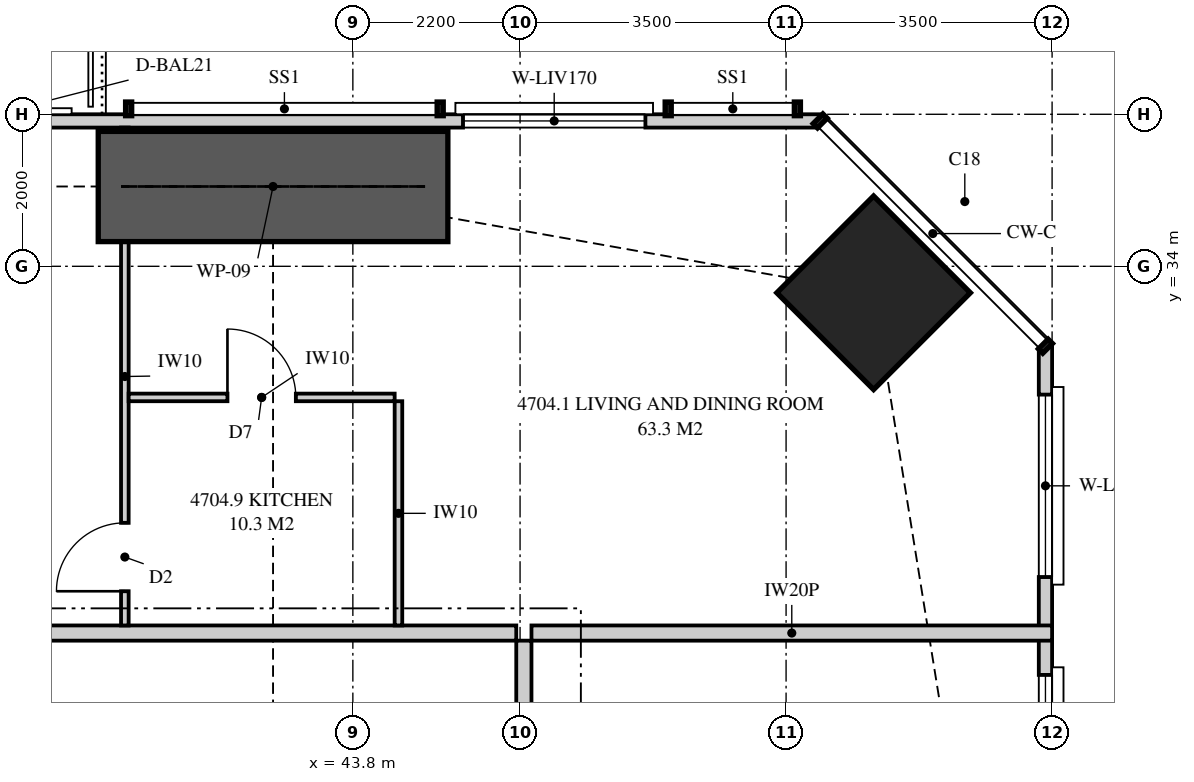
"""IFC4 building model, lengths in metres.
Left out: names, types, materials, properties, quantities, classifications, styles, units other than length and angle.
Written with IfcOpenShell. Run it as: python <this file> out.ifc"""

import sys

from ifc_helpers import new_model, si_unit, direction, frame, frame_2d, origin, origin_2d, place, context, subcontext, project, spatial, polyline, rectangle, outline, extrude, element, fill, save


model = new_model("IFC4")
c1 = context("Model", 3, precision=1e-05, world=origin(), true_north=direction((0.0, 1.0)))
c2 = subcontext(c1, "Body", "Model", "MODEL_VIEW")
j1 = project(units=[si_unit("LENGTHUNIT", "METRE"), si_unit("PLANEANGLEUNIT", "RADIAN")], contexts=[c1])
p1 = place(None, origin())
s1 = spatial("IfcSite", under=j1, at=p1, CompositionType="ELEMENT")
p2 = place(p1, origin())
s2 = spatial("IfcBuilding", under=s1, at=p2, CompositionType="ELEMENT")
p3 = place(p2, frame((0.0, 0.0, 174.45)))
s3 = spatial("IfcBuildingStorey", under=s2, at=p3, CompositionType="ELEMENT", Elevation=174.45)
p4 = place(p3, frame((50.652, 33.652, 0.0), z_axis=(0.0, 0.0, 1.0), x_axis=(0.707106781187, 0.707106781187, 0.0)))
e1 = element("IfcColumn", 1, at=p4, inside=s3, PredefinedType="COLUMN", context=c2, shape_type="SweptSolid", body=[
    extrude(rectangle(XDim=1.8, YDim=1.8, at=origin_2d()), origin(), (0.0, 0.0, 1.0), 3.35),
])
p5 = place(p3, frame((52.913, 3.051, 0.0), z_axis=(0.0, 0.0, 1.0), x_axis=(0.0, 1.0, 0.0)))
e2 = element("IfcWall", 2, at=p5, inside=s3, PredefinedType="SOLIDWALL", context=c2, shape_type="SweptSolid", body=[
    extrude(outline(polyline([(0.0, 0.0), (29.897, 0.0), (29.897, 3.11), (22.167, 3.11), (22.167, 2.15), (22.074, 2.15), (22.074, 3.11), (21.949, 3.11), (21.949, 2.15), (9.949, 2.15), (9.949, 3.11), (9.847, 3.11), (9.847, 2.15), (9.706, 2.15), (9.706, 3.11), (0.0, 3.11), (0.0, 0.0)])), frame((0.0, 0.087, 0.0), z_axis=(0.0, -1.0, 0.0), x_axis=(1.0, 0.0, 0.0)), (0.0, 0.0, 1.0), 0.175),
])
p6 = place(p5, frame((1.797, 0.0, 0.4)))
e3 = element("IfcOpeningElement", 3, at=p6, cuts=e2, PredefinedType="OPENING", context=c2, shape_type="SweptSolid", body=[
    extrude(rectangle(XDim=1.8, YDim=1.7, at=frame_2d((0.9, 0.85))), frame((0.0, 0.097, 0.0), z_axis=(0.0, -1.0, 0.0), x_axis=(1.0, 0.0, 0.0)), (0.0, 0.0, 1.0), 0.195),
])
p7 = place(p5, frame((6.321, 0.0, 0.4)))
e4 = element("IfcOpeningElement", 4, at=p7, cuts=e2, PredefinedType="OPENING", context=c2, shape_type="SweptSolid", body=[
    extrude(rectangle(XDim=1.2, YDim=1.7, at=frame_2d((0.6, 0.85))), frame((0.0, 0.097, 0.0), z_axis=(0.0, -1.0, 0.0), x_axis=(1.0, 0.0, 0.0)), (0.0, 0.0, 1.0), 0.195),
])
p8 = place(p5, frame((12.424, 0.0, 0.4)))
e5 = element("IfcOpeningElement", 5, at=p8, cuts=e2, PredefinedType="OPENING", context=c2, shape_type="SweptSolid", body=[
    extrude(rectangle(XDim=1.8, YDim=1.7, at=frame_2d((0.9, 0.85))), frame((0.0, 0.097, 0.0), z_axis=(0.0, -1.0, 0.0), x_axis=(1.0, 0.0, 0.0)), (0.0, 0.0, 1.0), 0.195),
])
p9 = place(p5, frame((15.274, 0.0, 0.0)))
e6 = element("IfcOpeningElement", 6, at=p9, cuts=e2, PredefinedType="OPENING", context=c2, shape_type="SweptSolid", body=[
    extrude(rectangle(XDim=1.8, YDim=2.1, at=frame_2d((0.9, 1.05))), frame((0.0, 0.097, 0.0), z_axis=(0.0, -1.0, 0.0), x_axis=(1.0, 0.0, 0.0)), (0.0, 0.0, 1.0), 0.195),
])
p10 = place(p5, frame((17.736, 0.0, 0.4)))
e7 = element("IfcOpeningElement", 7, at=p10, cuts=e2, PredefinedType="OPENING", context=c2, shape_type="SweptSolid", body=[
    extrude(rectangle(XDim=1.8, YDim=1.7, at=frame_2d((0.9, 0.85))), frame((0.0, 0.097, 0.0), z_axis=(0.0, -1.0, 0.0), x_axis=(1.0, 0.0, 0.0)), (0.0, 0.0, 1.0), 0.195),
])
p11 = place(p5, frame((24.373, 0.0, 0.4)))
e8 = element("IfcOpeningElement", 8, at=p11, cuts=e2, PredefinedType="OPENING", context=c2, shape_type="SweptSolid", body=[
    extrude(rectangle(XDim=1.2, YDim=1.7, at=frame_2d((0.6, 0.85))), frame((0.0, 0.097, 0.0), z_axis=(0.0, -1.0, 0.0), x_axis=(1.0, 0.0, 0.0)), (0.0, 0.0, 1.0), 0.195),
])
p12 = place(p5, frame((26.861, 0.0, 0.4)))
e9 = element("IfcOpeningElement", 9, at=p12, cuts=e2, PredefinedType="OPENING", context=c2, shape_type="SweptSolid", body=[
    extrude(rectangle(XDim=2.4, YDim=1.7, at=frame_2d((1.2, 0.85))), frame((0.0, 0.097, 0.0), z_axis=(0.0, -1.0, 0.0), x_axis=(1.0, 0.0, 0.0)), (0.0, 0.0, 1.0), 0.195),
])
p13 = place(p3, frame((49.949, 35.913, 0.0), z_axis=(0.0, 0.0, 1.0), x_axis=(-1.0, 0.0, 0.0)))
e10 = element("IfcWall", 10, at=p13, inside=s3, PredefinedType="SOLIDWALL", context=c2, shape_type="SweptSolid", body=[
    extrude(outline(polyline([(0.0, 0.0), (34.897, 0.0), (34.897, 3.11), (27.91, 3.11), (27.91, 2.15), (27.836, 2.15), (27.836, 3.11), (27.699, 3.11), (27.699, 2.15), (7.199, 2.15), (7.199, 3.11), (7.062, 3.11), (7.062, 2.15), (6.987, 2.15), (6.987, 3.11), (0.0, 3.11), (0.0, 0.0)])), frame((0.0, 0.087, 0.0), z_axis=(0.0, -1.0, 0.0), x_axis=(1.0, 0.0, 0.0)), (0.0, 0.0, 1.0), 0.175),
])
p14 = place(p13, frame((2.3, 0.0, 0.4)))
e11 = element("IfcOpeningElement", 11, at=p14, cuts=e10, PredefinedType="OPENING", context=c2, shape_type="SweptSolid", body=[
    extrude(rectangle(XDim=2.4, YDim=1.7, at=frame_2d((1.2, 0.85))), frame((0.0, 0.097, 0.0), z_axis=(0.0, -1.0, 0.0), x_axis=(1.0, 0.0, 0.0)), (0.0, 0.0, 1.0), 0.195),
])
p15 = place(p13, frame((10.299, 0.0, 0.0)))
e12 = element("IfcOpeningElement", 12, at=p15, cuts=e10, PredefinedType="OPENING", context=c2, shape_type="SweptSolid", body=[
    extrude(rectangle(XDim=1.8, YDim=2.1, at=frame_2d((0.9, 1.05))), frame((0.0, 0.097, 0.0), z_axis=(0.0, -1.0, 0.0), x_axis=(1.0, 0.0, 0.0)), (0.0, 0.0, 1.0), 0.195),
])
p16 = place(p13, frame((13.229, 0.0, 0.4)))
e13 = element("IfcOpeningElement", 13, at=p16, cuts=e10, PredefinedType="OPENING", context=c2, shape_type="SweptSolid", body=[
    extrude(rectangle(XDim=1.8, YDim=1.7, at=frame_2d((0.9, 0.85))), frame((0.0, 0.097, 0.0), z_axis=(0.0, -1.0, 0.0), x_axis=(1.0, 0.0, 0.0)), (0.0, 0.0, 1.0), 0.195),
])
p17 = place(p13, frame((19.879, 0.0, 0.4)))
e14 = element("IfcOpeningElement", 14, at=p17, cuts=e10, PredefinedType="OPENING", context=c2, shape_type="SweptSolid", body=[
    extrude(rectangle(XDim=1.8, YDim=1.7, at=frame_2d((0.9, 0.85))), frame((0.0, 0.097, 0.0), z_axis=(0.0, -1.0, 0.0), x_axis=(1.0, 0.0, 0.0)), (0.0, 0.0, 1.0), 0.195),
])
p18 = place(p13, frame((22.699, 0.0, 0.0)))
e15 = element("IfcOpeningElement", 15, at=p18, cuts=e10, PredefinedType="OPENING", context=c2, shape_type="SweptSolid", body=[
    extrude(rectangle(XDim=1.8, YDim=2.1, at=frame_2d((0.9, 1.05))), frame((0.0, 0.097, 0.0), z_axis=(0.0, -1.0, 0.0), x_axis=(1.0, 0.0, 0.0)), (0.0, 0.0, 1.0), 0.195),
])
p19 = place(p13, frame((30.243, 0.0, 0.4)))
e16 = element("IfcOpeningElement", 16, at=p19, cuts=e10, PredefinedType="OPENING", context=c2, shape_type="SweptSolid", body=[
    extrude(rectangle(XDim=1.2, YDim=1.7, at=frame_2d((0.6, 0.85))), frame((0.0, 0.097, 0.0), z_axis=(0.0, -1.0, 0.0), x_axis=(1.0, 0.0, 0.0)), (0.0, 0.0, 1.0), 0.195),
])
p20 = place(p3, frame((24.05, 29.175, 0.0), z_axis=(0.0, 0.0, 1.0), x_axis=(1.0, 0.0, 0.0)))
e17 = element("IfcWall", 17, at=p20, inside=s3, PredefinedType="PARTITIONING", context=c2, shape_type="SweptSolid", body=[
    extrude(outline(polyline([(0.0, 0.0), (21.9, 0.0), (21.9, 3.11), (19.037, 3.11), (19.037, 2.541), (18.363, 2.541), (18.363, 3.11), (8.787, 3.11), (8.787, 2.541), (8.113, 2.541), (8.113, 3.11), (0.0, 3.11), (0.0, 0.0)])), frame((0.0, 0.1, 0.0), z_axis=(0.0, -1.0, 0.0), x_axis=(1.0, 0.0, 0.0)), (0.0, 0.0, 1.0), 0.2),
])
p21 = place(p20, frame((13.925, 0.0, 0.0)))
e18 = element("IfcOpeningElement", 18, at=p21, cuts=e17, PredefinedType="OPENING", context=c2, shape_type="SweptSolid", body=[
    extrude(rectangle(XDim=1.05, YDim=2.2, at=frame_2d((0.525, 1.1))), frame((0.0, 0.11, 0.0), z_axis=(0.0, -1.0, 0.0), x_axis=(1.0, 0.0, 0.0)), (0.0, 0.0, 1.0), 0.22),
])
p22 = place(p3, frame((40.8, 35.825, 0.0), z_axis=(0.0, 0.0, 1.0), x_axis=(0.0, -1.0, 0.0)))
e19 = element("IfcWall", 19, at=p22, inside=s3, PredefinedType="PARTITIONING", context=c2, shape_type="SweptSolid", body=[
    extrude(outline(polyline([(0.0, 0.0), (6.55, 0.0), (6.55, 3.11), (1.635, 3.11), (1.635, 2.15), (0.0, 2.15), (0.0, 3.11), (0.0, 0.0)])), frame((0.0, 0.05, 0.0), z_axis=(0.0, -1.0, 0.0), x_axis=(1.0, 0.0, 0.0)), (0.0, 0.0, 1.0), 0.1),
])
p23 = place(p22, frame((5.2, 0.0, 0.0)))
e20 = element("IfcOpeningElement", 20, at=p23, cuts=e19, PredefinedType="OPENING", context=c2, shape_type="SweptSolid", body=[
    extrude(rectangle(XDim=0.9, YDim=2.1, at=frame_2d((0.45, 1.05))), frame((0.0, 0.06, 0.0), z_axis=(0.0, -1.0, 0.0), x_axis=(1.0, 0.0, 0.0)), (0.0, 0.0, 1.0), 0.12),
])
p24 = place(p3, frame((40.85, 32.275, 0.0), z_axis=(0.0, 0.0, 1.0), x_axis=(1.0, 0.0, 0.0)))
e21 = element("IfcWall", 21, at=p24, inside=s3, PredefinedType="PARTITIONING", context=c2, shape_type="SweptSolid", body=[
    extrude(outline(polyline([(0.0, 0.0), (3.5, 0.0), (3.5, 3.11), (2.188, 3.11), (2.188, 2.541), (1.613, 2.541), (1.613, 3.11), (0.0, 3.11), (0.0, 0.0)])), frame((0.0, 0.05, 0.0), z_axis=(0.0, -1.0, 0.0), x_axis=(1.0, 0.0, 0.0)), (0.0, 0.0, 1.0), 0.1),
])
p25 = place(p24, frame((1.3, 0.0, 0.0)))
e22 = element("IfcOpeningElement", 22, at=p25, cuts=e21, PredefinedType="OPENING", context=c2, shape_type="SweptSolid", body=[
    extrude(rectangle(XDim=0.9, YDim=2.1, at=frame_2d((0.45, 1.05))), frame((0.0, 0.06, 0.0), z_axis=(0.0, -1.0, 0.0), x_axis=(1.0, 0.0, 0.0)), (0.0, 0.0, 1.0), 0.12),
])
p26 = place(p3, frame((44.4, 32.225, 0.0), z_axis=(0.0, 0.0, 1.0), x_axis=(0.0, -1.0, 0.0)))
e23 = element("IfcWall", 23, at=p26, inside=s3, PredefinedType="PARTITIONING", context=c2, shape_type="SweptSolid", body=[
    extrude(rectangle(XDim=2.95, YDim=0.1, at=frame_2d((1.475, 0.0))), origin(), (0.0, 0.0, 1.0), 3.11),
])
p27 = place(p3, frame((46.15, 29.175, 0.0), z_axis=(0.0, 0.0, 1.0), x_axis=(1.0, 0.0, 0.0)))
e24 = element("IfcWall", 24, at=p27, inside=s3, PredefinedType="PARTITIONING", context=c2, shape_type="SweptSolid", body=[
    extrude(outline(polyline([(0.0, 0.0), (6.85, 0.0), (6.85, 3.11), (6.147, 3.11), (6.147, 2.15), (4.303, 2.15), (4.303, 3.11), (0.0, 3.11), (0.0, 0.0)])), frame((0.0, 0.1, 0.0), z_axis=(0.0, -1.0, 0.0), x_axis=(1.0, 0.0, 0.0)), (0.0, 0.0, 1.0), 0.2),
])
p28 = place(p3, frame((46.05, 23.25, 0.0), z_axis=(0.0, 0.0, 1.0), x_axis=(0.0, 1.0, 0.0)))
e25 = element("IfcWall", 25, at=p28, inside=s3, PredefinedType="PARTITIONING", context=c2, shape_type="SweptSolid", body=[
    extrude(outline(polyline([(0.0, 0.0), (5.825, 0.0), (5.825, 3.11), (2.087, 3.11), (2.087, 2.541), (1.413, 2.541), (1.413, 3.11), (0.0, 3.11), (0.0, 0.0)])), frame((0.0, 0.1, 0.0), z_axis=(0.0, -1.0, 0.0), x_axis=(1.0, 0.0, 0.0)), (0.0, 0.0, 1.0), 0.2),
])
p29 = place(p28, frame((2.413, 0.0, 0.0)))
e26 = element("IfcOpeningElement", 26, at=p29, cuts=e25, PredefinedType="OPENING", context=c2, shape_type="SweptSolid", body=[
    extrude(rectangle(XDim=1.05, YDim=2.2, at=frame_2d((0.525, 1.1))), frame((0.0, 0.11, 0.0), z_axis=(0.0, -1.0, 0.0), x_axis=(1.0, 0.0, 0.0)), (0.0, 0.0, 1.0), 0.22),
])
p30 = place(p3, frame((40.45, 35.05, 0.0), z_axis=(0.0, 0.0, 1.0), x_axis=(1.0, 0.0, 0.0)))
e27 = element("IfcWall", 27, at=p30, inside=s3, PredefinedType="SHEAR", context=c2, shape_type="SweptSolid", body=[
    extrude(rectangle(XDim=4.6, YDim=1.45, at=frame_2d((2.3, 0.0))), origin(), (0.0, 0.0, 1.0), 3.35),
])
p31 = place(p11, origin())
e28 = element("IfcWindow", 28, at=p31, inside=s3, PartitioningType="SINGLE_PANEL", PredefinedType="WINDOW", context=c2, shape_type="SweptSolid", body=[
    extrude(rectangle(XDim=1.2, YDim=1.7, at=frame_2d((0.6, 0.85))), frame((0.0, 0.03, 0.0), z_axis=(0.0, -1.0, 0.0), x_axis=(1.0, 0.0, 0.0)), (0.0, 0.0, 1.0), 0.06),
])
fill(e8, e28)
p32 = place(p12, origin())
e29 = element("IfcWindow", 29, at=p32, inside=s3, PartitioningType="SINGLE_PANEL", PredefinedType="WINDOW", context=c2, shape_type="SweptSolid", body=[
    extrude(rectangle(XDim=2.4, YDim=1.7, at=frame_2d((1.2, 0.85))), frame((0.0, 0.03, 0.0), z_axis=(0.0, -1.0, 0.0), x_axis=(1.0, 0.0, 0.0)), (0.0, 0.0, 1.0), 0.06),
])
fill(e9, e29)
p33 = place(p14, origin())
e30 = element("IfcWindow", 30, at=p33, inside=s3, PartitioningType="SINGLE_PANEL", PredefinedType="WINDOW", context=c2, shape_type="SweptSolid", body=[
    extrude(rectangle(XDim=2.4, YDim=1.7, at=frame_2d((1.2, 0.85))), frame((0.0, 0.03, 0.0), z_axis=(0.0, -1.0, 0.0), x_axis=(1.0, 0.0, 0.0)), (0.0, 0.0, 1.0), 0.06),
])
fill(e11, e30)
p34 = place(p23, frame((0.9, 0.0, 0.0), z_axis=(0.0, 0.0, 1.0), x_axis=(-1.0, 0.0, 0.0)))
e31 = element("IfcDoor", 31, at=p34, inside=s3, OperationType="SINGLE_SWING_LEFT", PredefinedType="DOOR", context=c2, shape_type="SweptSolid", body=[
    extrude(rectangle(XDim=0.9, YDim=2.1, at=frame_2d((0.45, 1.05))), frame((0.0, 0.025, 0.0), z_axis=(0.0, -1.0, 0.0), x_axis=(1.0, 0.0, 0.0)), (0.0, 0.0, 1.0), 0.05),
])
fill(e20, e31)
p35 = place(p25, origin())
e32 = element("IfcDoor", 32, at=p35, inside=s3, OperationType="SINGLE_SWING_LEFT", PredefinedType="DOOR", context=c2, shape_type="SweptSolid", body=[
    extrude(rectangle(XDim=0.9, YDim=2.1, at=frame_2d((0.45, 1.05))), frame((0.0, 0.025, 0.0), z_axis=(0.0, -1.0, 0.0), x_axis=(1.0, 0.0, 0.0)), (0.0, 0.0, 1.0), 0.05),
])
fill(e22, e32)
save(model, sys.argv[1])
